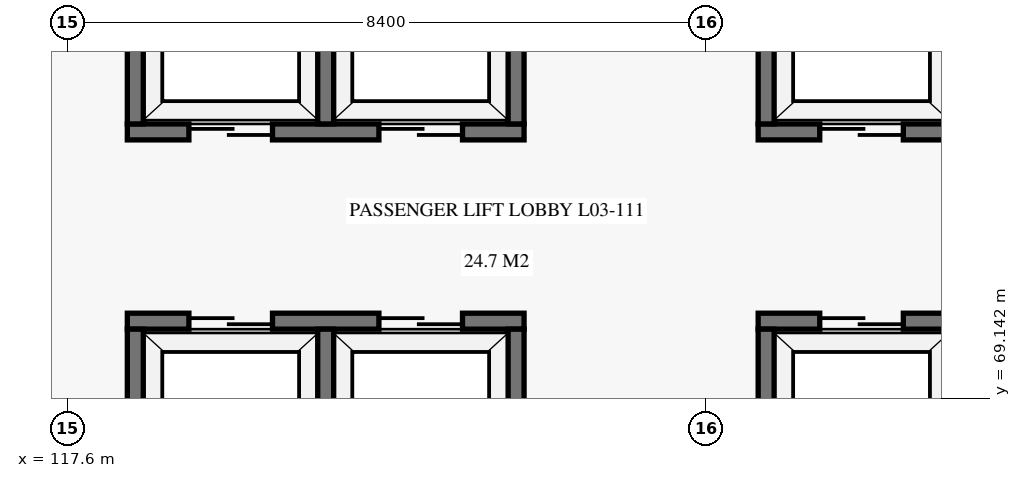
"""IFC4 building model, lengths in metres.
Left out: names, types, materials, properties, quantities, classifications, styles, units other than length and angle.
Written with IfcOpenShell. Run it as: python <this file> out.ifc"""

import sys

from ifc_helpers import new_model, si_unit, direction, frame, frame_2d, origin, place, context, subcontext, project, spatial, rectangle, extrude, element, fill, save


model = new_model("IFC4")
c1 = context("Model", 3, precision=1e-05, world=origin(), true_north=direction((0.0, 1.0)))
c2 = subcontext(c1, "Body", "Model", "MODEL_VIEW")
j1 = project(units=[si_unit("LENGTHUNIT", "METRE"), si_unit("PLANEANGLEUNIT", "RADIAN")], contexts=[c1])
p1 = place(None, origin())
s1 = spatial("IfcSite", under=j1, at=p1, CompositionType="ELEMENT")
p2 = place(p1, origin())
s2 = spatial("IfcBuilding", under=s1, at=p2, CompositionType="ELEMENT")
p3 = place(p2, frame((0.0, 0.0, 11.4)))
s3 = spatial("IfcBuildingStorey", under=s2, at=p3, CompositionType="ELEMENT", Elevation=11.4)
p4 = place(p3, frame((126.69, 70.155, 0.0), z_axis=(0.0, 0.0, 1.0), x_axis=(1.0, 0.0, 0.0)))
e1 = element("IfcWall", 1, at=p4, inside=s3, PredefinedType="SHEAR", context=c2, shape_type="SweptSolid", body=[
    extrude(rectangle(XDim=5.22, YDim=0.21, at=frame_2d((2.61, 0.0))), origin(), (0.0, 0.0, 1.0), 5.1),
])
p5 = place(p4, frame((0.81, 0.0, 0.0)))
e2 = element("IfcOpeningElement", 2, at=p5, cuts=e1, PredefinedType="OPENING", context=c2, shape_type="SweptSolid", body=[
    extrude(rectangle(XDim=1.1, YDim=2.15, at=frame_2d((0.55, 1.075))), frame((0.0, 0.115, 0.0), z_axis=(0.0, -1.0, 0.0), x_axis=(1.0, 0.0, 0.0)), (0.0, 0.0, 1.0), 0.23),
])
p6 = place(p4, frame((3.31, 0.0, 0.0)))
e3 = element("IfcOpeningElement", 3, at=p6, cuts=e1, PredefinedType="OPENING", context=c2, shape_type="SweptSolid", body=[
    extrude(rectangle(XDim=1.1, YDim=2.15, at=frame_2d((0.55, 1.075))), frame((0.0, 0.115, 0.0), z_axis=(0.0, -1.0, 0.0), x_axis=(1.0, 0.0, 0.0)), (0.0, 0.0, 1.0), 0.23),
])
p7 = place(p3, frame((126.795, 67.85, 0.0), z_axis=(0.0, 0.0, 1.0), x_axis=(0.0, 1.0, 0.0)))
e4 = element("IfcWall", 4, at=p7, inside=s3, PredefinedType="SHEAR", context=c2, shape_type="SweptSolid", body=[
    extrude(rectangle(XDim=2.2, YDim=0.21, at=frame_2d((1.1, 0.0))), origin(), (0.0, 0.0, 1.0), 5.1),
])
p8 = place(p3, frame((126.69, 72.645, 0.0), z_axis=(0.0, 0.0, 1.0), x_axis=(1.0, 0.0, 0.0)))
e5 = element("IfcWall", 5, at=p8, inside=s3, PredefinedType="SHEAR", context=c2, shape_type="SweptSolid", body=[
    extrude(rectangle(XDim=5.22, YDim=0.21, at=frame_2d((2.61, 0.0))), origin(), (0.0, 0.0, 1.0), 5.1),
])
p9 = place(p8, frame((0.81, 0.0, 0.0)))
e6 = element("IfcOpeningElement", 6, at=p9, cuts=e5, PredefinedType="OPENING", context=c2, shape_type="SweptSolid", body=[
    extrude(rectangle(XDim=1.1, YDim=2.15, at=frame_2d((0.55, 1.075))), frame((0.0, 0.115, 0.0), z_axis=(0.0, -1.0, 0.0), x_axis=(1.0, 0.0, 0.0)), (0.0, 0.0, 1.0), 0.23),
])
p10 = place(p8, frame((3.31, 0.0, 0.0)))
e7 = element("IfcOpeningElement", 7, at=p10, cuts=e5, PredefinedType="OPENING", context=c2, shape_type="SweptSolid", body=[
    extrude(rectangle(XDim=1.1, YDim=2.15, at=frame_2d((0.55, 1.075))), frame((0.0, 0.115, 0.0), z_axis=(0.0, -1.0, 0.0), x_axis=(1.0, 0.0, 0.0)), (0.0, 0.0, 1.0), 0.23),
])
p11 = place(p3, frame((126.795, 72.75, 0.0), z_axis=(0.0, 0.0, 1.0), x_axis=(0.0, 1.0, 0.0)))
e8 = element("IfcWall", 8, at=p11, inside=s3, PredefinedType="SHEAR", context=c2, shape_type="SweptSolid", body=[
    extrude(rectangle(XDim=2.2, YDim=0.21, at=frame_2d((1.1, 0.0))), origin(), (0.0, 0.0, 1.0), 5.1),
])
p12 = place(p3, frame((118.39, 70.155, 0.0), z_axis=(0.0, 0.0, 1.0), x_axis=(1.0, 0.0, 0.0)))
e9 = element("IfcWall", 9, at=p12, inside=s3, PredefinedType="SHEAR", context=c2, shape_type="SweptSolid", body=[
    extrude(rectangle(XDim=5.22, YDim=0.21, at=frame_2d((2.61, 0.0))), origin(), (0.0, 0.0, 1.0), 5.1),
])
p13 = place(p12, frame((0.81, 0.0, 0.0)))
e10 = element("IfcOpeningElement", 10, at=p13, cuts=e9, PredefinedType="OPENING", context=c2, shape_type="SweptSolid", body=[
    extrude(rectangle(XDim=1.1, YDim=2.15, at=frame_2d((0.55, 1.075))), frame((0.0, 0.115, 0.0), z_axis=(0.0, -1.0, 0.0), x_axis=(1.0, 0.0, 0.0)), (0.0, 0.0, 1.0), 0.23),
])
p14 = place(p12, frame((3.31, 0.0, 0.0)))
e11 = element("IfcOpeningElement", 11, at=p14, cuts=e9, PredefinedType="OPENING", context=c2, shape_type="SweptSolid", body=[
    extrude(rectangle(XDim=1.1, YDim=2.15, at=frame_2d((0.55, 1.075))), frame((0.0, 0.115, 0.0), z_axis=(0.0, -1.0, 0.0), x_axis=(1.0, 0.0, 0.0)), (0.0, 0.0, 1.0), 0.23),
])
for number, where, z_axis, x_axis in (
    (12, (118.495, 67.85, 0.0), (0.0, 0.0, 1.0), (0.0, 1.0, 0.0)),
    (13, (123.505, 67.85, 0.0), (0.0, 0.0, 1.0), (0.0, 1.0, 0.0)),
    (14, (121.0, 67.85, 0.0), (0.0, 0.0, 1.0), (0.0, 1.0, 0.0)),
):
    element("IfcWall", number, at=place(p3, frame(where, z_axis=z_axis, x_axis=x_axis)), inside=s3, PredefinedType="SHEAR", context=c2, shape_type="SweptSolid", body=[
        extrude(rectangle(XDim=2.2, YDim=0.21, at=frame_2d((1.1, 0.0))), origin(), (0.0, 0.0, 1.0), 5.1),
    ])
p15 = place(p3, frame((118.39, 72.645, 0.0), z_axis=(0.0, 0.0, 1.0), x_axis=(1.0, 0.0, 0.0)))
e15 = element("IfcWall", 15, at=p15, inside=s3, PredefinedType="SHEAR", context=c2, shape_type="SweptSolid", body=[
    extrude(rectangle(XDim=5.22, YDim=0.21, at=frame_2d((2.61, 0.0))), origin(), (0.0, 0.0, 1.0), 5.1),
])
p16 = place(p15, frame((0.81, 0.0, 0.0)))
e16 = element("IfcOpeningElement", 16, at=p16, cuts=e15, PredefinedType="OPENING", context=c2, shape_type="SweptSolid", body=[
    extrude(rectangle(XDim=1.1, YDim=2.15, at=frame_2d((0.55, 1.075))), frame((0.0, 0.115, 0.0), z_axis=(0.0, -1.0, 0.0), x_axis=(1.0, 0.0, 0.0)), (0.0, 0.0, 1.0), 0.23),
])
p17 = place(p15, frame((3.31, 0.0, 0.0)))
e17 = element("IfcOpeningElement", 17, at=p17, cuts=e15, PredefinedType="OPENING", context=c2, shape_type="SweptSolid", body=[
    extrude(rectangle(XDim=1.1, YDim=2.15, at=frame_2d((0.55, 1.075))), frame((0.0, 0.115, 0.0), z_axis=(0.0, -1.0, 0.0), x_axis=(1.0, 0.0, 0.0)), (0.0, 0.0, 1.0), 0.23),
])
for number, where, z_axis, x_axis in (
    (18, (118.495, 72.75, 0.0), (0.0, 0.0, 1.0), (0.0, 1.0, 0.0)),
    (19, (123.505, 72.75, 0.0), (0.0, 0.0, 1.0), (0.0, 1.0, 0.0)),
    (20, (121.0, 72.75, 0.0), (0.0, 0.0, 1.0), (0.0, 1.0, 0.0)),
):
    element("IfcWall", number, at=place(p3, frame(where, z_axis=z_axis, x_axis=x_axis)), inside=s3, PredefinedType="SHEAR", context=c2, shape_type="SweptSolid", body=[
        extrude(rectangle(XDim=2.2, YDim=0.21, at=frame_2d((1.1, 0.0))), origin(), (0.0, 0.0, 1.0), 5.1),
    ])
p18 = place(p5, origin())
e21 = element("IfcDoor", 21, at=p18, inside=s3, OperationType="DOUBLE_DOOR_SLIDING", PredefinedType="DOOR", context=c2, shape_type="SweptSolid", body=[
    extrude(rectangle(XDim=1.1, YDim=2.15, at=frame_2d((0.55, 1.075))), frame((0.0, 0.025, 0.0), z_axis=(0.0, -1.0, 0.0), x_axis=(1.0, 0.0, 0.0)), (0.0, 0.0, 1.0), 0.05),
])
fill(e2, e21)
p19 = place(p9, origin())
e22 = element("IfcDoor", 22, at=p19, inside=s3, OperationType="DOUBLE_DOOR_SLIDING", PredefinedType="DOOR", context=c2, shape_type="SweptSolid", body=[
    extrude(rectangle(XDim=1.1, YDim=2.15, at=frame_2d((0.55, 1.075))), frame((0.0, 0.025, 0.0), z_axis=(0.0, -1.0, 0.0), x_axis=(1.0, 0.0, 0.0)), (0.0, 0.0, 1.0), 0.05),
])
fill(e6, e22)
p20 = place(p13, origin())
e23 = element("IfcDoor", 23, at=p20, inside=s3, OperationType="DOUBLE_DOOR_SLIDING", PredefinedType="DOOR", context=c2, shape_type="SweptSolid", body=[
    extrude(rectangle(XDim=1.1, YDim=2.15, at=frame_2d((0.55, 1.075))), frame((0.0, 0.025, 0.0), z_axis=(0.0, -1.0, 0.0), x_axis=(1.0, 0.0, 0.0)), (0.0, 0.0, 1.0), 0.05),
])
fill(e10, e23)
p21 = place(p14, origin())
e24 = element("IfcDoor", 24, at=p21, inside=s3, OperationType="DOUBLE_DOOR_SLIDING", PredefinedType="DOOR", context=c2, shape_type="SweptSolid", body=[
    extrude(rectangle(XDim=1.1, YDim=2.15, at=frame_2d((0.55, 1.075))), frame((0.0, 0.025, 0.0), z_axis=(0.0, -1.0, 0.0), x_axis=(1.0, 0.0, 0.0)), (0.0, 0.0, 1.0), 0.05),
])
fill(e11, e24)
p22 = place(p16, origin())
e25 = element("IfcDoor", 25, at=p22, inside=s3, OperationType="DOUBLE_DOOR_SLIDING", PredefinedType="DOOR", context=c2, shape_type="SweptSolid", body=[
    extrude(rectangle(XDim=1.1, YDim=2.15, at=frame_2d((0.55, 1.075))), frame((0.0, 0.025, 0.0), z_axis=(0.0, -1.0, 0.0), x_axis=(1.0, 0.0, 0.0)), (0.0, 0.0, 1.0), 0.05),
])
fill(e16, e25)
p23 = place(p17, origin())
e26 = element("IfcDoor", 26, at=p23, inside=s3, OperationType="DOUBLE_DOOR_SLIDING", PredefinedType="DOOR", context=c2, shape_type="SweptSolid", body=[
    extrude(rectangle(XDim=1.1, YDim=2.15, at=frame_2d((0.55, 1.075))), frame((0.0, 0.025, 0.0), z_axis=(0.0, -1.0, 0.0), x_axis=(1.0, 0.0, 0.0)), (0.0, 0.0, 1.0), 0.05),
])
fill(e17, e26)
save(model, sys.argv[1])
